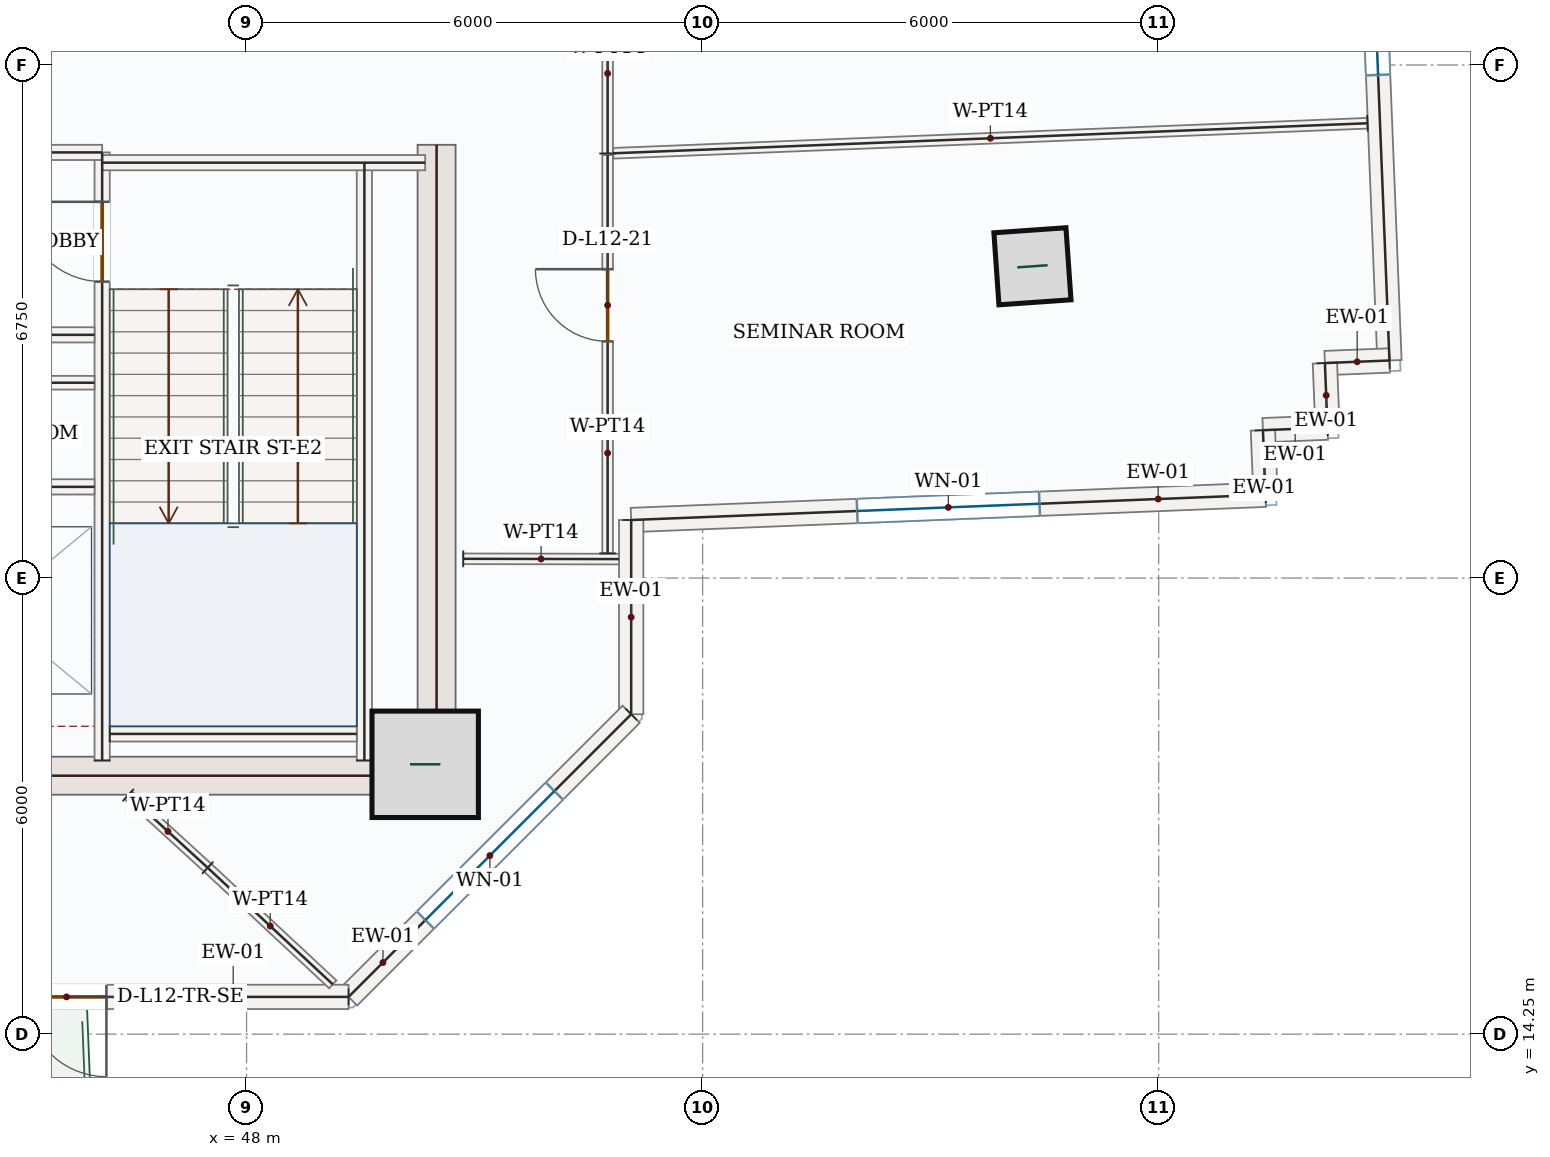
"""IFC4 building model, lengths in metres.
Left out: names, types, materials, properties, quantities, classifications, styles, units other than length and angle.
Written with IfcOpenShell. Run it as: python <this file> out.ifc"""

import sys

from ifc_helpers import new_model, si_unit, direction, frame, frame_2d, origin, origin_2d, place, context, subcontext, project, spatial, rectangle, hollow_rectangle, extrude, source, transform, mapped, element, fill, save


model = new_model("IFC4")
c1 = context("Model", 3, precision=1e-05, world=origin(), true_north=direction((0.0, 1.0)))
c2 = subcontext(c1, "Body", "Model", "MODEL_VIEW")
j1 = project(units=[si_unit("LENGTHUNIT", "METRE"), si_unit("PLANEANGLEUNIT", "RADIAN")], contexts=[c1])
p1 = place(None, origin())
s1 = spatial("IfcSite", under=j1, at=p1, CompositionType="ELEMENT")
p2 = place(p1, origin())
s2 = spatial("IfcBuilding", under=s1, at=p2, CompositionType="ELEMENT")
p3 = place(p2, frame((0.0, 0.0, 58.5)))
s3 = spatial("IfcBuildingStorey", under=s2, at=p3, CompositionType="ELEMENT", Elevation=58.5)
m1 = source(origin(), c2, "Body", "SweptSolid", [
    extrude(rectangle(XDim=8.55, YDim=0.5, at=frame_2d((4.275, 0.0))), origin(), (0.0, 0.0, 1.0), 3.95),
])
p4 = place(p3, frame((50.5, 17.4, 0.0), z_axis=(0.0, 0.0, 1.0), x_axis=(0.0, 1.0, 0.0)))
e1 = element("IfcWall", 1, at=p4, inside=s3, PredefinedType="SHEAR", context=c2, shape_type="MappedRepresentation", body=[
    mapped(m1, transform((0.0, 0.0, 0.0), x_axis=(1.0, 0.0, 0.0), y_axis=(0.0, 1.0, 0.0), z_axis=(0.0, 0.0, 1.0), scale=1.0)),
])
m2 = source(origin(), c2, "Body", "SweptSolid", [
    extrude(rectangle(XDim=7.0, YDim=0.5, at=frame_2d((3.5, 0.0))), origin(), (0.0, 0.0, 1.0), 3.95),
])
p5 = place(p3, frame((43.25, 17.65, 0.0), z_axis=(0.0, 0.0, 1.0), x_axis=(1.0, 0.0, 0.0)))
e2 = element("IfcWall", 2, at=p5, inside=s3, PredefinedType="SHEAR", context=c2, shape_type="MappedRepresentation", body=[
    mapped(m2, transform((0.0, 0.0, 0.0), x_axis=(1.0, 0.0, 0.0), y_axis=(0.0, 1.0, 0.0), z_axis=(0.0, 0.0, 1.0), scale=1.0)),
])
m3 = source(origin(), c2, "Body", "SweptSolid", [
    extrude(rectangle(XDim=1.4, YDim=1.4, at=origin_2d()), origin(), (0.0, 0.0, 1.0), 4.2),
])
p6 = place(p3, frame((50.35, 17.8, 0.0), z_axis=(0.0, 0.0, 1.0), x_axis=(1.0, 0.0, 0.0)))
e3 = element("IfcColumn", 3, at=p6, inside=s3, PredefinedType="COLUMN", context=c2, shape_type="MappedRepresentation", body=[
    mapped(m3, transform((0.0, 0.0, 0.0), x_axis=(1.0, 0.0, 0.0), y_axis=(0.0, 1.0, 0.0), z_axis=(0.0, 0.0, 1.0), scale=1.0)),
])
m4 = source(origin(), c2, "Body", "SweptSolid", [
    extrude(hollow_rectangle(XDim=0.95, YDim=0.95, WallThickness=0.05, at=origin_2d()), origin(), (0.0, 0.0, 1.0), 4.2),
])
p7 = place(p3, frame((58.339, 24.352, 0.0), z_axis=(0.0, 0.0, 1.0), x_axis=(0.99756405026, 0.069756473744, 0.0)))
e4 = element("IfcColumn", 4, at=p7, inside=s3, PredefinedType="COLUMN", context=c2, shape_type="MappedRepresentation", body=[
    mapped(m4, transform((0.0, 0.0, 0.0), x_axis=(1.0, 0.0, 0.0), y_axis=(0.0, 1.0, 0.0), z_axis=(0.0, 0.0, 1.0), scale=1.0)),
])
p8 = place(p3, frame((62.641, 33.025, 0.0), z_axis=(0.0, 0.0, 1.0), x_axis=(0.03977146366, -0.999208802342, 0.0)))
e5 = element("IfcWall", 5, at=p8, inside=s3, PredefinedType="SOLIDWALL", context=c2, shape_type="SweptSolid", body=[
    extrude(rectangle(XDim=9.92, YDim=0.32, at=frame_2d((4.96, 0.0))), origin(), (0.0, 0.0, 1.0), 3.95),
])
p9 = place(p8, frame((3.76, 0.0, 0.85)))
e6 = element("IfcOpeningElement", 6, at=p9, cuts=e5, PredefinedType="OPENING", context=c2, shape_type="SweptSolid", body=[
    extrude(rectangle(XDim=2.4, YDim=1.8, at=frame_2d((1.2, 0.9))), frame((0.0, 0.17, 0.0), z_axis=(0.0, -1.0, 0.0), x_axis=(1.0, 0.0, 0.0)), (0.0, 0.0, 1.0), 0.34),
])
m5 = source(origin(), c2, "Body", "SweptSolid", [
    extrude(rectangle(XDim=0.85, YDim=0.32, at=frame_2d((0.425, 0.0))), origin(), (0.0, 0.0, 1.0), 3.95),
])
p10 = place(p3, frame((63.036, 23.113, 0.0), z_axis=(0.0, 0.0, 1.0), x_axis=(-0.999202334929, -0.039933618331, 0.0)))
e7 = element("IfcWall", 7, at=p10, inside=s3, PredefinedType="SOLIDWALL", context=c2, shape_type="MappedRepresentation", body=[
    mapped(m5, transform((0.0, 0.0, 0.0), x_axis=(1.0, 0.0, 0.0), y_axis=(0.0, 1.0, 0.0), z_axis=(0.0, 0.0, 1.0), scale=1.0)),
])
m6 = source(origin(), c2, "Body", "SweptSolid", [
    extrude(rectangle(XDim=0.85, YDim=0.32, at=frame_2d((0.425, 0.0))), origin(), (0.0, 0.0, 1.0), 3.95),
])
for number, where, z_axis, x_axis in (
    (8, (62.187, 23.079, 0.0), (0.0, 0.0, 1.0), (0.04, -0.999, 0.0)),
    (9, (62.22, 22.229, 0.0), (0.0, 0.0, 1.0), (-0.999, -0.04, 0.0)),
    (10, (61.371, 22.196, 0.0), (0.0, 0.0, 1.0), (0.04, -0.999, 0.0)),
):
    element("IfcWall", number, at=place(p3, frame(where, z_axis=z_axis, x_axis=x_axis)), inside=s3, PredefinedType="SOLIDWALL", context=c2, shape_type="MappedRepresentation", body=[
        mapped(m6, transform((0.0, 0.0, 0.0), x_axis=(1.0, 0.0, 0.0), y_axis=(0.0, 1.0, 0.0), z_axis=(0.0, 0.0, 1.0), scale=1.0)),
    ])
p11 = place(p3, frame((61.405, 21.346, 0.0), z_axis=(0.0, 0.0, 1.0), x_axis=(-0.999208226989, -0.039785916063, 0.0)))
e11 = element("IfcWall", 11, at=p11, inside=s3, PredefinedType="SOLIDWALL", context=c2, shape_type="SweptSolid", body=[
    extrude(rectangle(XDim=8.352, YDim=0.32, at=frame_2d((4.176, 0.0))), origin(), (0.0, 0.0, 1.0), 3.95),
])
p12 = place(p11, frame((2.976, 0.0, 0.85)))
e12 = element("IfcOpeningElement", 12, at=p12, cuts=e11, PredefinedType="OPENING", context=c2, shape_type="SweptSolid", body=[
    extrude(rectangle(XDim=2.4, YDim=1.8, at=frame_2d((1.2, 0.9))), frame((0.0, 0.17, 0.0), z_axis=(0.0, -1.0, 0.0), x_axis=(1.0, 0.0, 0.0)), (0.0, 0.0, 1.0), 0.34),
])
m7 = source(origin(), c2, "Body", "SweptSolid", [
    extrude(rectangle(XDim=2.556, YDim=0.32, at=frame_2d((1.278, 0.0))), origin(), (0.0, 0.0, 1.0), 3.95),
])
p13 = place(p3, frame((53.06, 21.014, 0.0), z_axis=(0.0, 0.0, 1.0), x_axis=(0.0, -1.0, 0.0)))
e13 = element("IfcWall", 13, at=p13, inside=s3, PredefinedType="SOLIDWALL", context=c2, shape_type="MappedRepresentation", body=[
    mapped(m7, transform((0.0, 0.0, 0.0), x_axis=(1.0, 0.0, 0.0), y_axis=(0.0, 1.0, 0.0), z_axis=(0.0, 0.0, 1.0), scale=1.0)),
])
p14 = place(p3, frame((53.06, 18.458, 0.0), z_axis=(0.0, 0.0, 1.0), x_axis=(-0.707106781187, -0.707106781187, 0.0)))
e14 = element("IfcWall", 14, at=p14, inside=s3, PredefinedType="SOLIDWALL", context=c2, shape_type="SweptSolid", body=[
    extrude(rectangle(XDim=5.258, YDim=0.32, at=frame_2d((2.629, 0.0))), origin(), (0.0, 0.0, 1.0), 3.95),
])
p15 = place(p14, frame((1.429, 0.0, 0.85)))
e15 = element("IfcOpeningElement", 15, at=p15, cuts=e14, PredefinedType="OPENING", context=c2, shape_type="SweptSolid", body=[
    extrude(rectangle(XDim=2.4, YDim=1.8, at=frame_2d((1.2, 0.9))), frame((0.0, 0.17, 0.0), z_axis=(0.0, -1.0, 0.0), x_axis=(1.0, 0.0, 0.0)), (0.0, 0.0, 1.0), 0.34),
])
p16 = place(p3, frame((49.342, 14.74, 0.0), z_axis=(0.0, 0.0, 1.0), x_axis=(-1.0, 0.0, 0.0)))
e16 = element("IfcWall", 16, at=p16, inside=s3, PredefinedType="SOLIDWALL", context=c2, shape_type="SweptSolid", body=[
    extrude(rectangle(XDim=6.189, YDim=0.32, at=frame_2d((3.094, 0.0))), origin(), (0.0, 0.0, 1.0), 3.95),
])
p17 = place(p16, frame((3.186, 0.0, 0.0)))
e17 = element("IfcOpeningElement", 17, at=p17, cuts=e16, PredefinedType="OPENING", context=c2, shape_type="SweptSolid", body=[
    extrude(rectangle(XDim=1.05, YDim=2.15, at=frame_2d((0.525, 1.075))), frame((0.0, 0.17, 0.0), z_axis=(0.0, -1.0, 0.0), x_axis=(1.0, 0.0, 0.0)), (0.0, 0.0, 1.0), 0.34),
])
m8 = source(origin(), c2, "Body", "SweptSolid", [
    extrude(rectangle(XDim=7.87, YDim=0.2, at=frame_2d((3.935, 0.0))), origin(), (0.0, 0.0, 1.0), 3.95),
])
p18 = place(p3, frame((49.55, 17.85, 0.0), z_axis=(0.0, 0.0, 1.0), x_axis=(0.0, 1.0, 0.0)))
e18 = element("IfcWall", 18, at=p18, inside=s3, PredefinedType="SOLIDWALL", context=c2, shape_type="MappedRepresentation", body=[
    mapped(m8, transform((0.0, 0.0, 0.0), x_axis=(1.0, 0.0, 0.0), y_axis=(0.0, 1.0, 0.0), z_axis=(0.0, 0.0, 1.0), scale=1.0)),
])
p19 = place(p3, frame((46.1, 17.85, 0.0), z_axis=(0.0, 0.0, 1.0), x_axis=(0.0, 1.0, 0.0)))
e19 = element("IfcWall", 19, at=p19, inside=s3, PredefinedType="SOLIDWALL", context=c2, shape_type="SweptSolid", body=[
    extrude(rectangle(XDim=8.0, YDim=0.2, at=frame_2d((4.0, 0.0))), origin(), (0.0, 0.0, 1.0), 3.95),
])
p20 = place(p19, frame((6.3, 0.0, 0.0)))
e20 = element("IfcOpeningElement", 20, at=p20, cuts=e19, PredefinedType="OPENING", context=c2, shape_type="SweptSolid", body=[
    extrude(rectangle(XDim=1.05, YDim=2.15, at=frame_2d((0.525, 1.075))), frame((0.0, 0.11, 0.0), z_axis=(0.0, -1.0, 0.0), x_axis=(1.0, 0.0, 0.0)), (0.0, 0.0, 1.0), 0.22),
])
m9 = source(origin(), c2, "Body", "SweptSolid", [
    extrude(rectangle(XDim=3.0, YDim=0.2, at=frame_2d((1.5, 0.0))), origin(), (0.0, 0.0, 1.0), 3.95),
])
p21 = place(p3, frame((43.1, 25.85, 0.0), z_axis=(0.0, 0.0, 1.0), x_axis=(1.0, 0.0, 0.0)))
e21 = element("IfcWall", 21, at=p21, inside=s3, PredefinedType="SOLIDWALL", context=c2, shape_type="MappedRepresentation", body=[
    mapped(m9, transform((0.0, 0.0, 0.0), x_axis=(1.0, 0.0, 0.0), y_axis=(0.0, 1.0, 0.0), z_axis=(0.0, 0.0, 1.0), scale=1.0)),
])
m10 = source(origin(), c2, "Body", "SweptSolid", [
    extrude(rectangle(XDim=4.25, YDim=0.2, at=frame_2d((2.125, 0.0))), origin(), (0.0, 0.0, 1.0), 3.95),
])
p22 = place(p3, frame((46.1, 25.715, 0.0), z_axis=(0.0, 0.0, 1.0), x_axis=(1.0, 0.0, 0.0)))
e22 = element("IfcWall", 22, at=p22, inside=s3, PredefinedType="SOLIDWALL", context=c2, shape_type="MappedRepresentation", body=[
    mapped(m10, transform((0.0, 0.0, 0.0), x_axis=(1.0, 0.0, 0.0), y_axis=(0.0, 1.0, 0.0), z_axis=(0.0, 0.0, 1.0), scale=1.0)),
])
m11 = source(origin(), c2, "Body", "SweptSolid", [
    extrude(rectangle(XDim=3.25, YDim=0.2, at=frame_2d((1.625, 0.0))), origin(), (0.0, 0.0, 1.0), 3.95),
])
p23 = place(p3, frame((46.2, 18.2, 0.0), z_axis=(0.0, 0.0, 1.0), x_axis=(1.0, 0.0, 0.0)))
e23 = element("IfcWall", 23, at=p23, inside=s3, PredefinedType="SOLIDWALL", context=c2, shape_type="MappedRepresentation", body=[
    mapped(m11, transform((0.0, 0.0, 0.0), x_axis=(1.0, 0.0, 0.0), y_axis=(0.0, 1.0, 0.0), z_axis=(0.0, 0.0, 1.0), scale=1.0)),
])
m12 = source(origin(), c2, "Body", "SweptSolid", [
    extrude(rectangle(XDim=2.75, YDim=0.2, at=frame_2d((1.375, 0.0))), origin(), (0.0, 0.0, 1.0), 3.95),
])
for number, where, z_axis, x_axis in (
    (24, (43.25, 23.45, 0.0), (0.0, 0.0, 1.0), (1.0, 0.0, 0.0)),
    (25, (43.25, 21.45, 0.0), (0.0, 0.0, 1.0), (1.0, 0.0, 0.0)),
):
    element("IfcWall", number, at=place(p3, frame(where, z_axis=z_axis, x_axis=x_axis)), inside=s3, PredefinedType="SOLIDWALL", context=c2, shape_type="MappedRepresentation", body=[
        mapped(m12, transform((0.0, 0.0, 0.0), x_axis=(1.0, 0.0, 0.0), y_axis=(0.0, 1.0, 0.0), z_axis=(0.0, 0.0, 1.0), scale=1.0)),
    ])
m13 = source(origin(), c2, "Body", "SweptSolid", [
    extrude(rectangle(XDim=2.75, YDim=0.18, at=frame_2d((1.375, 0.0))), origin(), (0.0, 0.0, 1.0), 3.95),
])
p24 = place(p3, frame((43.25, 22.82, 0.0), z_axis=(0.0, 0.0, 1.0), x_axis=(1.0, 0.0, 0.0)))
e26 = element("IfcWall", 26, at=p24, inside=s3, PredefinedType="PARTITIONING", context=c2, shape_type="MappedRepresentation", body=[
    mapped(m13, transform((0.0, 0.0, 0.0), x_axis=(1.0, 0.0, 0.0), y_axis=(0.0, 1.0, 0.0), z_axis=(0.0, 0.0, 1.0), scale=1.0)),
])
p25 = place(p3, frame((52.75, 25.835, 0.0), z_axis=(0.0, 0.0, 1.0), x_axis=(0.0, 1.0, 0.0)))
e27 = element("IfcWall", 27, at=p25, inside=s3, PredefinedType="PARTITIONING", context=c2, shape_type="SweptSolid", body=[
    extrude(rectangle(XDim=3.843, YDim=0.14, at=frame_2d((1.921, 0.0))), origin(), (0.0, 0.0, 1.0), 3.95),
])
p26 = place(p25, frame((2.257, 0.0, 0.0)))
e28 = element("IfcOpeningElement", 28, at=p26, cuts=e27, PredefinedType="OPENING", context=c2, shape_type="SweptSolid", body=[
    extrude(rectangle(XDim=0.95, YDim=2.15, at=frame_2d((0.475, 1.075))), frame((0.0, 0.08, 0.0), z_axis=(0.0, -1.0, 0.0), x_axis=(1.0, 0.0, 0.0)), (0.0, 0.0, 1.0), 0.16),
])
m14 = source(origin(), c2, "Body", "SweptSolid", [
    extrude(rectangle(XDim=9.929, YDim=0.14, at=frame_2d((4.965, 0.0))), origin(), (0.0, 0.0, 1.0), 3.95),
])
p27 = place(p3, frame((62.747, 26.233, 0.0), z_axis=(0.0, 0.0, 1.0), x_axis=(-0.999208364847, -0.039782453661, 0.0)))
e29 = element("IfcWall", 29, at=p27, inside=s3, PredefinedType="PARTITIONING", context=c2, shape_type="MappedRepresentation", body=[
    mapped(m14, transform((0.0, 0.0, 0.0), x_axis=(1.0, 0.0, 0.0), y_axis=(0.0, 1.0, 0.0), z_axis=(0.0, 0.0, 1.0), scale=1.0)),
])
m15 = source(origin(), c2, "Body", "SweptSolid", [
    extrude(rectangle(XDim=1.417, YDim=0.14, at=frame_2d((0.708, 0.0))), origin(), (0.0, 0.0, 1.0), 3.95),
])
p28 = place(p3, frame((46.443, 17.395, 0.0), z_axis=(0.0, 0.0, 1.0), x_axis=(0.737776192982, -0.675045397784, 0.0)))
e30 = element("IfcWall", 30, at=p28, inside=s3, PredefinedType="PARTITIONING", context=c2, shape_type="MappedRepresentation", body=[
    mapped(m15, transform((0.0, 0.0, 0.0), x_axis=(1.0, 0.0, 0.0), y_axis=(0.0, 1.0, 0.0), z_axis=(0.0, 0.0, 1.0), scale=1.0)),
])
m16 = source(origin(), c2, "Body", "SweptSolid", [
    extrude(rectangle(XDim=2.25, YDim=0.14, at=frame_2d((1.125, 0.0))), origin(), (0.0, 0.0, 1.0), 3.95),
])
p29 = place(p3, frame((47.489, 16.439, 0.0), z_axis=(0.0, 0.0, 1.0), x_axis=(0.731524295554, -0.68181537458, 0.0)))
e31 = element("IfcWall", 31, at=p29, inside=s3, PredefinedType="PARTITIONING", context=c2, shape_type="MappedRepresentation", body=[
    mapped(m16, transform((0.0, 0.0, 0.0), x_axis=(1.0, 0.0, 0.0), y_axis=(0.0, 1.0, 0.0), z_axis=(0.0, 0.0, 1.0), scale=1.0)),
])
m17 = source(origin(), c2, "Body", "SweptSolid", [
    extrude(rectangle(XDim=2.049, YDim=0.14, at=frame_2d((1.025, 0.0))), origin(), (0.0, 0.0, 1.0), 3.95),
])
p30 = place(p3, frame((50.851, 20.503, 0.0), z_axis=(0.0, 0.0, 1.0), x_axis=(0.999998403336, -0.001786987854, 0.0)))
e32 = element("IfcWall", 32, at=p30, inside=s3, PredefinedType="PARTITIONING", context=c2, shape_type="MappedRepresentation", body=[
    mapped(m17, transform((0.0, 0.0, 0.0), x_axis=(1.0, 0.0, 0.0), y_axis=(0.0, 1.0, 0.0), z_axis=(0.0, 0.0, 1.0), scale=1.0)),
])
p31 = place(p3, frame((52.75, 20.575, 0.0), z_axis=(0.0, 0.0, 1.0), x_axis=(0.0, 1.0, 0.0)))
e33 = element("IfcWall", 33, at=p31, inside=s3, PredefinedType="PARTITIONING", context=c2, shape_type="SweptSolid", body=[
    extrude(rectangle(XDim=5.24, YDim=0.14, at=frame_2d((2.62, 0.0))), origin(), (0.0, 0.0, 1.0), 3.95),
])
p32 = place(p31, frame((2.789, 0.0, 0.0)))
e34 = element("IfcOpeningElement", 34, at=p32, cuts=e33, PredefinedType="OPENING", context=c2, shape_type="SweptSolid", body=[
    extrude(rectangle(XDim=0.95, YDim=2.15, at=frame_2d((0.475, 1.075))), frame((0.0, 0.08, 0.0), z_axis=(0.0, -1.0, 0.0), x_axis=(1.0, 0.0, 0.0)), (0.0, 0.0, 1.0), 0.16),
])
m18 = source(origin(), c2, "Body", "SweptSolid", [
    extrude(rectangle(XDim=2.4, YDim=1.8, at=frame_2d((1.2, 0.9))), frame((0.0, 0.03, 0.0), z_axis=(0.0, -1.0, 0.0), x_axis=(1.0, 0.0, 0.0)), (0.0, 0.0, 1.0), 0.06),
])
p33 = place(p9, origin())
e35 = element("IfcWindow", 35, at=p33, inside=s3, PartitioningType="DOUBLE_PANEL_VERTICAL", PredefinedType="WINDOW", context=c2, shape_type="MappedRepresentation", body=[
    mapped(m18, transform((0.0, 0.0, 0.0), x_axis=(1.0, 0.0, 0.0), y_axis=(0.0, 1.0, 0.0), z_axis=(0.0, 0.0, 1.0), scale=1.0)),
])
fill(e6, e35)
p34 = place(p12, origin())
e36 = element("IfcWindow", 36, at=p34, inside=s3, PartitioningType="DOUBLE_PANEL_VERTICAL", PredefinedType="WINDOW", context=c2, shape_type="MappedRepresentation", body=[
    mapped(m18, transform((0.0, 0.0, 0.0), x_axis=(1.0, 0.0, 0.0), y_axis=(0.0, 1.0, 0.0), z_axis=(0.0, 0.0, 1.0), scale=1.0)),
])
fill(e12, e36)
p35 = place(p15, origin())
e37 = element("IfcWindow", 37, at=p35, inside=s3, PartitioningType="DOUBLE_PANEL_VERTICAL", PredefinedType="WINDOW", context=c2, shape_type="MappedRepresentation", body=[
    mapped(m18, transform((0.0, 0.0, 0.0), x_axis=(1.0, 0.0, 0.0), y_axis=(0.0, 1.0, 0.0), z_axis=(0.0, 0.0, 1.0), scale=1.0)),
])
fill(e15, e37)
m19 = source(origin(), c2, "Body", "SweptSolid", [
    extrude(rectangle(XDim=1.05, YDim=2.15, at=frame_2d((0.525, 1.075))), frame((0.0, 0.025, 0.0), z_axis=(0.0, -1.0, 0.0), x_axis=(1.0, 0.0, 0.0)), (0.0, 0.0, 1.0), 0.05),
])
p36 = place(p17, origin())
e38 = element("IfcDoor", 38, at=p36, inside=s3, OperationType="SINGLE_SWING_LEFT", PredefinedType="DOOR", context=c2, shape_type="MappedRepresentation", body=[
    mapped(m19, transform((0.0, 0.0, 0.0), x_axis=(1.0, 0.0, 0.0), y_axis=(0.0, 1.0, 0.0), z_axis=(0.0, 0.0, 1.0), scale=1.0)),
])
fill(e17, e38)
p37 = place(p20, origin())
e39 = element("IfcDoor", 39, at=p37, inside=s3, OperationType="SINGLE_SWING_RIGHT", PredefinedType="DOOR", context=c2, shape_type="MappedRepresentation", body=[
    mapped(m19, transform((0.0, 0.0, 0.0), x_axis=(1.0, 0.0, 0.0), y_axis=(0.0, 1.0, 0.0), z_axis=(0.0, 0.0, 1.0), scale=1.0)),
])
fill(e20, e39)
m20 = source(origin(), c2, "Body", "SweptSolid", [
    extrude(rectangle(XDim=0.95, YDim=2.15, at=frame_2d((0.475, 1.075))), frame((0.0, 0.025, 0.0), z_axis=(0.0, -1.0, 0.0), x_axis=(1.0, 0.0, 0.0)), (0.0, 0.0, 1.0), 0.05),
])
p38 = place(p32, origin())
e40 = element("IfcDoor", 40, at=p38, inside=s3, OperationType="SINGLE_SWING_RIGHT", PredefinedType="DOOR", context=c2, shape_type="MappedRepresentation", body=[
    mapped(m20, transform((0.0, 0.0, 0.0), x_axis=(1.0, 0.0, 0.0), y_axis=(0.0, 1.0, 0.0), z_axis=(0.0, 0.0, 1.0), scale=1.0)),
])
fill(e34, e40)
save(model, sys.argv[1])
